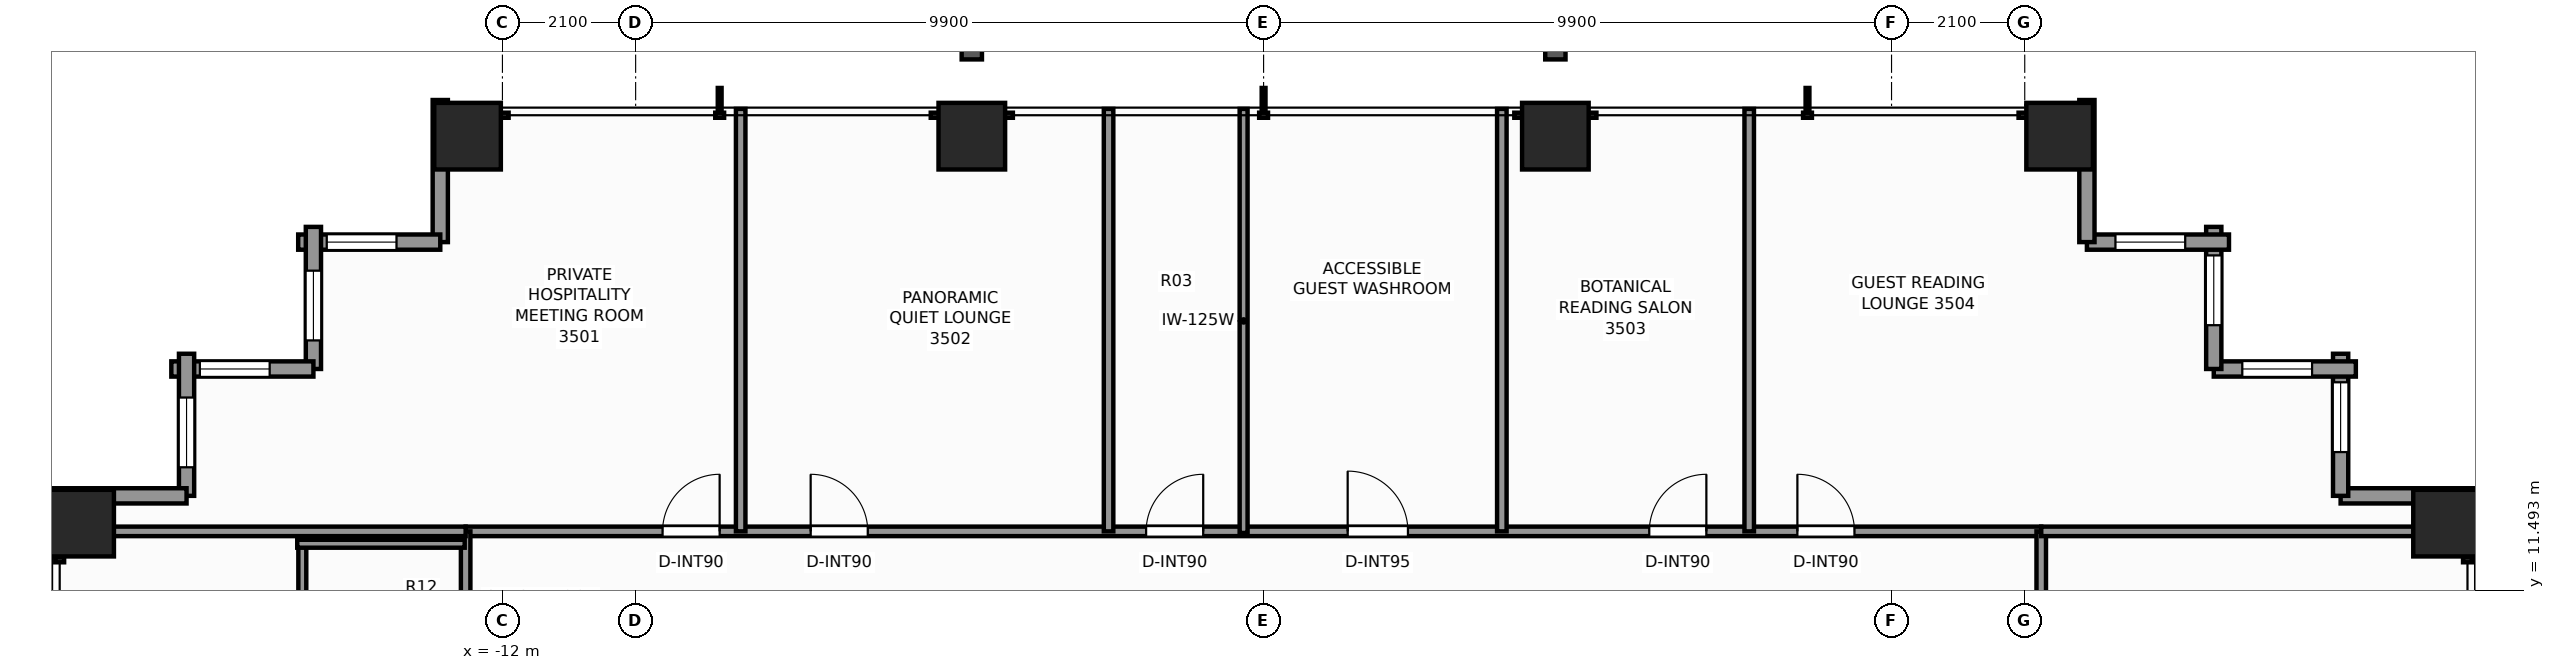
"""IFC4 building model, lengths in metres.
Left out: names, types, materials, properties, quantities, classifications, styles, units other than length and angle.
Written with IfcOpenShell. Run it as: python <this file> out.ifc"""

import sys

from ifc_helpers import new_model, si_unit, direction, frame, frame_2d, origin, origin_2d, place, context, subcontext, project, spatial, rectangle, extrude, element, fill, save


model = new_model("IFC4")
c1 = context("Model", 3, precision=1e-05, world=origin(), true_north=direction((0.0, 1.0)))
c2 = subcontext(c1, "Body", "Model", "MODEL_VIEW")
j1 = project(units=[si_unit("LENGTHUNIT", "METRE"), si_unit("PLANEANGLEUNIT", "RADIAN")], contexts=[c1])
p1 = place(None, origin())
s1 = spatial("IfcSite", under=j1, at=p1, CompositionType="ELEMENT")
p2 = place(p1, origin())
s2 = spatial("IfcBuilding", under=s1, at=p2, CompositionType="ELEMENT")
p3 = place(p2, frame((0.0, 0.0, 121.7)))
s3 = spatial("IfcBuildingStorey", under=s2, at=p3, CompositionType="ELEMENT", Elevation=121.7)
for number, where, z_axis, x_axis in (
    (1, (-12.55, 18.65, 0.0), (0.0, 0.0, 1.0), (1.0, 0.0, 0.0)),
    (2, (-4.6, 18.65, 0.0), (0.0, 0.0, 1.0), (1.0, 0.0, 0.0)),
    (3, (4.6, 18.65, 0.0), (0.0, 0.0, 1.0), (1.0, 0.0, 0.0)),
    (4, (12.55, 18.65, 0.0), (0.0, 0.0, 1.0), (1.0, 0.0, 0.0)),
    (5, (-18.65, 12.55, 0.0), (0.0, 0.0, 1.0), (1.0, 0.0, 0.0)),
    (6, (18.65, 12.55, 0.0), (0.0, 0.0, 1.0), (1.0, 0.0, 0.0)),
):
    element("IfcColumn", number, at=place(p3, frame(where, z_axis=z_axis, x_axis=x_axis)), inside=s3, PredefinedType="COLUMN", context=c2, shape_type="SweptSolid", body=[
        extrude(rectangle(XDim=1.05, YDim=1.05, at=origin_2d()), origin(), (0.0, 0.0, 1.0), 3.3),
    ])
p4 = place(p3, frame((16.98, 12.98, 0.0), z_axis=(0.0, 0.0, 1.0), x_axis=(1.0, 0.0, 0.0)))
e7 = element("IfcWall", 7, at=p4, inside=s3, PredefinedType="STANDARD", context=c2, shape_type="SweptSolid", body=[
    extrude(rectangle(XDim=2.24, YDim=0.24, at=frame_2d((1.12, 0.0))), origin(), (0.0, 0.0, 1.0), 2.459),
])
p5 = place(p3, frame((16.98, 15.22, 0.0), z_axis=(0.0, 0.0, 1.0), x_axis=(0.0, -1.0, 0.0)))
e8 = element("IfcWall", 8, at=p5, inside=s3, PredefinedType="STANDARD", context=c2, shape_type="SweptSolid", body=[
    extrude(rectangle(XDim=2.24, YDim=0.24, at=frame_2d((1.12, 0.0))), origin(), (0.0, 0.0, 1.0), 2.459),
])
p6 = place(p5, frame((0.45, 0.0, 0.65)))
e9 = element("IfcOpeningElement", 9, at=p6, cuts=e8, PredefinedType="OPENING", context=c2, shape_type="SweptSolid", body=[
    extrude(rectangle(XDim=1.1, YDim=1.45, at=frame_2d((0.55, 0.725))), frame((0.0, 0.13, 0.0), z_axis=(0.0, -1.0, 0.0), x_axis=(1.0, 0.0, 0.0)), (0.0, 0.0, 1.0), 0.26),
])
p7 = place(p3, frame((14.98, 14.98, 0.0), z_axis=(0.0, 0.0, 1.0), x_axis=(1.0, 0.0, 0.0)))
e10 = element("IfcWall", 10, at=p7, inside=s3, PredefinedType="STANDARD", context=c2, shape_type="SweptSolid", body=[
    extrude(rectangle(XDim=2.24, YDim=0.24, at=frame_2d((1.12, 0.0))), origin(), (0.0, 0.0, 1.0), 2.459),
])
p8 = place(p7, frame((0.45, 0.0, 0.65)))
e11 = element("IfcOpeningElement", 11, at=p8, cuts=e10, PredefinedType="OPENING", context=c2, shape_type="SweptSolid", body=[
    extrude(rectangle(XDim=1.1, YDim=1.45, at=frame_2d((0.55, 0.725))), frame((0.0, 0.13, 0.0), z_axis=(0.0, -1.0, 0.0), x_axis=(1.0, 0.0, 0.0)), (0.0, 0.0, 1.0), 0.26),
])
p9 = place(p3, frame((14.98, 17.22, 0.0), z_axis=(0.0, 0.0, 1.0), x_axis=(0.0, -1.0, 0.0)))
e12 = element("IfcWall", 12, at=p9, inside=s3, PredefinedType="STANDARD", context=c2, shape_type="SweptSolid", body=[
    extrude(rectangle(XDim=2.24, YDim=0.24, at=frame_2d((1.12, 0.0))), origin(), (0.0, 0.0, 1.0), 2.459),
])
p10 = place(p9, frame((0.45, 0.0, 0.65)))
e13 = element("IfcOpeningElement", 13, at=p10, cuts=e12, PredefinedType="OPENING", context=c2, shape_type="SweptSolid", body=[
    extrude(rectangle(XDim=1.1, YDim=1.45, at=frame_2d((0.55, 0.725))), frame((0.0, 0.13, 0.0), z_axis=(0.0, -1.0, 0.0), x_axis=(1.0, 0.0, 0.0)), (0.0, 0.0, 1.0), 0.26),
])
p11 = place(p3, frame((12.98, 16.98, 0.0), z_axis=(0.0, 0.0, 1.0), x_axis=(1.0, 0.0, 0.0)))
e14 = element("IfcWall", 14, at=p11, inside=s3, PredefinedType="STANDARD", context=c2, shape_type="SweptSolid", body=[
    extrude(rectangle(XDim=2.24, YDim=0.24, at=frame_2d((1.12, 0.0))), origin(), (0.0, 0.0, 1.0), 2.459),
])
p12 = place(p11, frame((0.45, 0.0, 0.65)))
e15 = element("IfcOpeningElement", 15, at=p12, cuts=e14, PredefinedType="OPENING", context=c2, shape_type="SweptSolid", body=[
    extrude(rectangle(XDim=1.1, YDim=1.45, at=frame_2d((0.55, 0.725))), frame((0.0, 0.13, 0.0), z_axis=(0.0, -1.0, 0.0), x_axis=(1.0, 0.0, 0.0)), (0.0, 0.0, 1.0), 0.26),
])
for number, where, z_axis, x_axis in (
    (16, (12.98, 19.22, 0.0), (0.0, 0.0, 1.0), (0.0, -1.0, 0.0)),
    (17, (-12.98, 16.98, 0.0), (0.0, 0.0, 1.0), (0.0, 1.0, 0.0)),
):
    element("IfcWall", number, at=place(p3, frame(where, z_axis=z_axis, x_axis=x_axis)), inside=s3, PredefinedType="STANDARD", context=c2, shape_type="SweptSolid", body=[
        extrude(rectangle(XDim=2.24, YDim=0.24, at=frame_2d((1.12, 0.0))), origin(), (0.0, 0.0, 1.0), 2.459),
    ])
p13 = place(p3, frame((-15.22, 16.98, 0.0), z_axis=(0.0, 0.0, 1.0), x_axis=(1.0, 0.0, 0.0)))
e18 = element("IfcWall", 18, at=p13, inside=s3, PredefinedType="STANDARD", context=c2, shape_type="SweptSolid", body=[
    extrude(rectangle(XDim=2.24, YDim=0.24, at=frame_2d((1.12, 0.0))), origin(), (0.0, 0.0, 1.0), 2.459),
])
p14 = place(p13, frame((0.45, 0.0, 0.65)))
e19 = element("IfcOpeningElement", 19, at=p14, cuts=e18, PredefinedType="OPENING", context=c2, shape_type="SweptSolid", body=[
    extrude(rectangle(XDim=1.1, YDim=1.45, at=frame_2d((0.55, 0.725))), frame((0.0, 0.13, 0.0), z_axis=(0.0, -1.0, 0.0), x_axis=(1.0, 0.0, 0.0)), (0.0, 0.0, 1.0), 0.26),
])
p15 = place(p3, frame((-14.98, 14.98, 0.0), z_axis=(0.0, 0.0, 1.0), x_axis=(0.0, 1.0, 0.0)))
e20 = element("IfcWall", 20, at=p15, inside=s3, PredefinedType="STANDARD", context=c2, shape_type="SweptSolid", body=[
    extrude(rectangle(XDim=2.24, YDim=0.24, at=frame_2d((1.12, 0.0))), origin(), (0.0, 0.0, 1.0), 2.459),
])
p16 = place(p15, frame((0.45, 0.0, 0.65)))
e21 = element("IfcOpeningElement", 21, at=p16, cuts=e20, PredefinedType="OPENING", context=c2, shape_type="SweptSolid", body=[
    extrude(rectangle(XDim=1.1, YDim=1.45, at=frame_2d((0.55, 0.725))), frame((0.0, 0.13, 0.0), z_axis=(0.0, -1.0, 0.0), x_axis=(1.0, 0.0, 0.0)), (0.0, 0.0, 1.0), 0.26),
])
p17 = place(p3, frame((-17.22, 14.98, 0.0), z_axis=(0.0, 0.0, 1.0), x_axis=(1.0, 0.0, 0.0)))
e22 = element("IfcWall", 22, at=p17, inside=s3, PredefinedType="STANDARD", context=c2, shape_type="SweptSolid", body=[
    extrude(rectangle(XDim=2.24, YDim=0.24, at=frame_2d((1.12, 0.0))), origin(), (0.0, 0.0, 1.0), 2.459),
])
p18 = place(p17, frame((0.45, 0.0, 0.65)))
e23 = element("IfcOpeningElement", 23, at=p18, cuts=e22, PredefinedType="OPENING", context=c2, shape_type="SweptSolid", body=[
    extrude(rectangle(XDim=1.1, YDim=1.45, at=frame_2d((0.55, 0.725))), frame((0.0, 0.13, 0.0), z_axis=(0.0, -1.0, 0.0), x_axis=(1.0, 0.0, 0.0)), (0.0, 0.0, 1.0), 0.26),
])
p19 = place(p3, frame((-16.98, 12.98, 0.0), z_axis=(0.0, 0.0, 1.0), x_axis=(0.0, 1.0, 0.0)))
e24 = element("IfcWall", 24, at=p19, inside=s3, PredefinedType="STANDARD", context=c2, shape_type="SweptSolid", body=[
    extrude(rectangle(XDim=2.24, YDim=0.24, at=frame_2d((1.12, 0.0))), origin(), (0.0, 0.0, 1.0), 2.459),
])
p20 = place(p19, frame((0.45, 0.0, 0.65)))
e25 = element("IfcOpeningElement", 25, at=p20, cuts=e24, PredefinedType="OPENING", context=c2, shape_type="SweptSolid", body=[
    extrude(rectangle(XDim=1.1, YDim=1.45, at=frame_2d((0.55, 0.725))), frame((0.0, 0.13, 0.0), z_axis=(0.0, -1.0, 0.0), x_axis=(1.0, 0.0, 0.0)), (0.0, 0.0, 1.0), 0.26),
])
p21 = place(p3, frame((-19.22, 12.98, 0.0), z_axis=(0.0, 0.0, 1.0), x_axis=(1.0, 0.0, 0.0)))
e26 = element("IfcWall", 26, at=p21, inside=s3, PredefinedType="STANDARD", context=c2, shape_type="SweptSolid", body=[
    extrude(rectangle(XDim=2.24, YDim=0.24, at=frame_2d((1.12, 0.0))), origin(), (0.0, 0.0, 1.0), 2.459),
])
p22 = place(p3, frame((-12.58, 12.42, 0.0), z_axis=(0.0, 0.0, 1.0), x_axis=(1.0, 0.0, 0.0)))
e27 = element("IfcWall", 27, at=p22, inside=s3, PredefinedType="PARTITIONING", context=c2, shape_type="SweptSolid", body=[
    extrude(rectangle(XDim=24.84, YDim=0.15, at=frame_2d((12.42, 0.0))), origin(), (0.0, 0.0, 1.0), 2.292),
])
p23 = place(p22, frame((3.104, 0.0, 0.0)))
e28 = element("IfcOpeningElement", 28, at=p23, cuts=e27, PredefinedType="OPENING", context=c2, shape_type="SweptSolid", body=[
    extrude(rectangle(XDim=0.9, YDim=2.06, at=frame_2d((0.45, 1.03))), frame((0.0, 0.085, 0.0), z_axis=(0.0, -1.0, 0.0), x_axis=(1.0, 0.0, 0.0)), (0.0, 0.0, 1.0), 0.17),
])
p24 = place(p22, frame((5.439, 0.0, 0.0)))
e29 = element("IfcOpeningElement", 29, at=p24, cuts=e27, PredefinedType="OPENING", context=c2, shape_type="SweptSolid", body=[
    extrude(rectangle(XDim=0.9, YDim=2.06, at=frame_2d((0.45, 1.03))), frame((0.0, 0.085, 0.0), z_axis=(0.0, -1.0, 0.0), x_axis=(1.0, 0.0, 0.0)), (0.0, 0.0, 1.0), 0.17),
])
p25 = place(p22, frame((10.728, 0.0, 0.0)))
e30 = element("IfcOpeningElement", 30, at=p25, cuts=e27, PredefinedType="OPENING", context=c2, shape_type="SweptSolid", body=[
    extrude(rectangle(XDim=0.9, YDim=2.06, at=frame_2d((0.45, 1.03))), frame((0.0, 0.085, 0.0), z_axis=(0.0, -1.0, 0.0), x_axis=(1.0, 0.0, 0.0)), (0.0, 0.0, 1.0), 0.17),
])
p26 = place(p22, frame((13.906, 0.0, 0.0)))
e31 = element("IfcOpeningElement", 31, at=p26, cuts=e27, PredefinedType="OPENING", context=c2, shape_type="SweptSolid", body=[
    extrude(rectangle(XDim=0.95, YDim=2.06, at=frame_2d((0.475, 1.03))), frame((0.0, 0.085, 0.0), z_axis=(0.0, -1.0, 0.0), x_axis=(1.0, 0.0, 0.0)), (0.0, 0.0, 1.0), 0.17),
])
p27 = place(p22, frame((18.661, 0.0, 0.0)))
e32 = element("IfcOpeningElement", 32, at=p27, cuts=e27, PredefinedType="OPENING", context=c2, shape_type="SweptSolid", body=[
    extrude(rectangle(XDim=0.9, YDim=2.06, at=frame_2d((0.45, 1.03))), frame((0.0, 0.085, 0.0), z_axis=(0.0, -1.0, 0.0), x_axis=(1.0, 0.0, 0.0)), (0.0, 0.0, 1.0), 0.17),
])
p28 = place(p22, frame((20.996, 0.0, 0.0)))
e33 = element("IfcOpeningElement", 33, at=p28, cuts=e27, PredefinedType="OPENING", context=c2, shape_type="SweptSolid", body=[
    extrude(rectangle(XDim=0.9, YDim=2.06, at=frame_2d((0.45, 1.03))), frame((0.0, 0.085, 0.0), z_axis=(0.0, -1.0, 0.0), x_axis=(1.0, 0.0, 0.0)), (0.0, 0.0, 1.0), 0.17),
])
p29 = place(p3, frame((-12.58, 7.4, 0.0), z_axis=(0.0, 0.0, 1.0), x_axis=(0.0, 1.0, 0.0)))
e34 = element("IfcWall", 34, at=p29, inside=s3, PredefinedType="PARTITIONING", context=c2, shape_type="SweptSolid", body=[
    extrude(rectangle(XDim=5.02, YDim=0.15, at=frame_2d((2.51, 0.0))), origin(), (0.0, 0.0, 1.0), 2.292),
])
p30 = place(p29, frame((0.689, 0.0, 0.0)))
e35 = element("IfcOpeningElement", 35, at=p30, cuts=e34, PredefinedType="OPENING", context=c2, shape_type="SweptSolid", body=[
    extrude(rectangle(XDim=0.95, YDim=2.06, at=frame_2d((0.475, 1.03))), frame((0.0, 0.085, 0.0), z_axis=(0.0, -1.0, 0.0), x_axis=(1.0, 0.0, 0.0)), (0.0, 0.0, 1.0), 0.17),
])
p31 = place(p3, frame((12.26, -12.42, 0.0), z_axis=(0.0, 0.0, 1.0), x_axis=(0.0, 1.0, 0.0)))
e36 = element("IfcWall", 36, at=p31, inside=s3, PredefinedType="PARTITIONING", context=c2, shape_type="SweptSolid", body=[
    extrude(rectangle(XDim=24.84, YDim=0.15, at=frame_2d((12.42, 0.0))), origin(), (0.0, 0.0, 1.0), 2.292),
])
p32 = place(p31, frame((4.224, 0.0, 0.0)))
e37 = element("IfcOpeningElement", 37, at=p32, cuts=e36, PredefinedType="OPENING", context=c2, shape_type="SweptSolid", body=[
    extrude(rectangle(XDim=0.95, YDim=2.06, at=frame_2d((0.475, 1.03))), frame((0.0, 0.085, 0.0), z_axis=(0.0, -1.0, 0.0), x_axis=(1.0, 0.0, 0.0)), (0.0, 0.0, 1.0), 0.17),
])
p33 = place(p31, frame((10.417, 0.0, 0.0)))
e38 = element("IfcOpeningElement", 38, at=p33, cuts=e36, PredefinedType="OPENING", context=c2, shape_type="SweptSolid", body=[
    extrude(rectangle(XDim=0.95, YDim=2.06, at=frame_2d((0.475, 1.03))), frame((0.0, 0.085, 0.0), z_axis=(0.0, -1.0, 0.0), x_axis=(1.0, 0.0, 0.0)), (0.0, 0.0, 1.0), 0.17),
])
p34 = place(p31, frame((18.556, 0.0, 0.0)))
e39 = element("IfcOpeningElement", 39, at=p34, cuts=e36, PredefinedType="OPENING", context=c2, shape_type="SweptSolid", body=[
    extrude(rectangle(XDim=0.95, YDim=2.06, at=frame_2d((0.475, 1.03))), frame((0.0, 0.085, 0.0), z_axis=(0.0, -1.0, 0.0), x_axis=(1.0, 0.0, 0.0)), (0.0, 0.0, 1.0), 0.17),
])
p35 = place(p31, frame((20.916, 0.0, 0.0)))
e40 = element("IfcOpeningElement", 40, at=p35, cuts=e36, PredefinedType="OPENING", context=c2, shape_type="SweptSolid", body=[
    extrude(rectangle(XDim=0.9, YDim=2.06, at=frame_2d((0.45, 1.03))), frame((0.0, 0.085, 0.0), z_axis=(0.0, -1.0, 0.0), x_axis=(1.0, 0.0, 0.0)), (0.0, 0.0, 1.0), 0.17),
])
p36 = place(p3, frame((-19.08, 12.42, 0.0), z_axis=(0.0, 0.0, 1.0), x_axis=(1.0, 0.0, 0.0)))
e41 = element("IfcWall", 41, at=p36, inside=s3, PredefinedType="PARTITIONING", context=c2, shape_type="SweptSolid", body=[
    extrude(rectangle(XDim=6.5, YDim=0.15, at=frame_2d((3.25, 0.0))), origin(), (0.0, 0.0, 1.0), 2.292),
])
p37 = place(p3, frame((12.26, 12.42, 0.0), z_axis=(0.0, 0.0, 1.0), x_axis=(1.0, 0.0, 0.0)))
e42 = element("IfcWall", 42, at=p37, inside=s3, PredefinedType="PARTITIONING", context=c2, shape_type="SweptSolid", body=[
    extrude(rectangle(XDim=6.82, YDim=0.15, at=frame_2d((3.41, 0.0))), origin(), (0.0, 0.0, 1.0), 2.292),
])
for number, where, z_axis, x_axis in (
    (43, (-8.244, 12.42, 0.0), (0.0, 0.0, 1.0), (0.0, 1.0, 0.0)),
    (44, (-2.444, 12.42, 0.0), (0.0, 0.0, 1.0), (0.0, 1.0, 0.0)),
    (45, (3.756, 12.42, 0.0), (0.0, 0.0, 1.0), (0.0, 1.0, 0.0)),
):
    element("IfcWall", number, at=place(p3, frame(where, z_axis=z_axis, x_axis=x_axis)), inside=s3, PredefinedType="PARTITIONING", context=c2, shape_type="SweptSolid", body=[
        extrude(rectangle(XDim=6.66, YDim=0.15, at=frame_2d((3.33, 0.0))), origin(), (0.0, 0.0, 1.0), 2.449),
    ])
p38 = place(p3, frame((-0.315, 12.395, 0.0), z_axis=(0.0, 0.0, 1.0), x_axis=(0.0, 1.0, 0.0)))
e46 = element("IfcWall", 46, at=p38, inside=s3, PredefinedType="PARTITIONING", context=c2, shape_type="SweptSolid", body=[
    extrude(rectangle(XDim=6.685, YDim=0.125, at=frame_2d((3.343, 0.0))), origin(), (0.0, 0.0, 1.0), 2.449),
])
p39 = place(p3, frame((7.656, 12.42, 0.0), z_axis=(0.0, 0.0, 1.0), x_axis=(0.0, 1.0, 0.0)))
e47 = element("IfcWall", 47, at=p39, inside=s3, PredefinedType="PARTITIONING", context=c2, shape_type="SweptSolid", body=[
    extrude(rectangle(XDim=6.66, YDim=0.15, at=frame_2d((3.33, 0.0))), origin(), (0.0, 0.0, 1.0), 2.449),
])
p40 = place(p3, frame((-15.155, 9.765, 0.0), z_axis=(0.0, 0.0, 1.0), x_axis=(0.0, 1.0, 0.0)))
e48 = element("IfcWall", 48, at=p40, inside=s3, PredefinedType="PARTITIONING", context=c2, shape_type="SweptSolid", body=[
    extrude(rectangle(XDim=2.52, YDim=0.125, at=frame_2d((1.26, 0.0))), origin(), (0.0, 0.0, 1.0), 2.292),
])
p41 = place(p3, frame((-15.235, 12.225, 0.0), z_axis=(0.0, 0.0, 1.0), x_axis=(1.0, 0.0, 0.0)))
e49 = element("IfcWall", 49, at=p41, inside=s3, PredefinedType="PARTITIONING", context=c2, shape_type="SweptSolid", body=[
    extrude(rectangle(XDim=2.64, YDim=0.125, at=frame_2d((1.32, 0.0))), origin(), (0.0, 0.0, 1.0), 3.08),
])
p42 = place(p6, origin())
e50 = element("IfcWindow", 50, at=p42, inside=s3, PartitioningType="SINGLE_PANEL", PredefinedType="WINDOW", context=c2, shape_type="SweptSolid", body=[
    extrude(rectangle(XDim=1.1, YDim=1.45, at=frame_2d((0.55, 0.725))), frame((0.0, 0.03, 0.0), z_axis=(0.0, -1.0, 0.0), x_axis=(1.0, 0.0, 0.0)), (0.0, 0.0, 1.0), 0.06),
])
fill(e9, e50)
p43 = place(p8, origin())
e51 = element("IfcWindow", 51, at=p43, inside=s3, PartitioningType="SINGLE_PANEL", PredefinedType="WINDOW", context=c2, shape_type="SweptSolid", body=[
    extrude(rectangle(XDim=1.1, YDim=1.45, at=frame_2d((0.55, 0.725))), frame((0.0, 0.03, 0.0), z_axis=(0.0, -1.0, 0.0), x_axis=(1.0, 0.0, 0.0)), (0.0, 0.0, 1.0), 0.06),
])
fill(e11, e51)
p44 = place(p10, origin())
e52 = element("IfcWindow", 52, at=p44, inside=s3, PartitioningType="SINGLE_PANEL", PredefinedType="WINDOW", context=c2, shape_type="SweptSolid", body=[
    extrude(rectangle(XDim=1.1, YDim=1.45, at=frame_2d((0.55, 0.725))), frame((0.0, 0.03, 0.0), z_axis=(0.0, -1.0, 0.0), x_axis=(1.0, 0.0, 0.0)), (0.0, 0.0, 1.0), 0.06),
])
fill(e13, e52)
p45 = place(p12, origin())
e53 = element("IfcWindow", 53, at=p45, inside=s3, PartitioningType="SINGLE_PANEL", PredefinedType="WINDOW", context=c2, shape_type="SweptSolid", body=[
    extrude(rectangle(XDim=1.1, YDim=1.45, at=frame_2d((0.55, 0.725))), frame((0.0, 0.03, 0.0), z_axis=(0.0, -1.0, 0.0), x_axis=(1.0, 0.0, 0.0)), (0.0, 0.0, 1.0), 0.06),
])
fill(e15, e53)
p46 = place(p14, origin())
e54 = element("IfcWindow", 54, at=p46, inside=s3, PartitioningType="SINGLE_PANEL", PredefinedType="WINDOW", context=c2, shape_type="SweptSolid", body=[
    extrude(rectangle(XDim=1.1, YDim=1.45, at=frame_2d((0.55, 0.725))), frame((0.0, 0.03, 0.0), z_axis=(0.0, -1.0, 0.0), x_axis=(1.0, 0.0, 0.0)), (0.0, 0.0, 1.0), 0.06),
])
fill(e19, e54)
p47 = place(p16, origin())
e55 = element("IfcWindow", 55, at=p47, inside=s3, PartitioningType="SINGLE_PANEL", PredefinedType="WINDOW", context=c2, shape_type="SweptSolid", body=[
    extrude(rectangle(XDim=1.1, YDim=1.45, at=frame_2d((0.55, 0.725))), frame((0.0, 0.03, 0.0), z_axis=(0.0, -1.0, 0.0), x_axis=(1.0, 0.0, 0.0)), (0.0, 0.0, 1.0), 0.06),
])
fill(e21, e55)
p48 = place(p18, origin())
e56 = element("IfcWindow", 56, at=p48, inside=s3, PartitioningType="SINGLE_PANEL", PredefinedType="WINDOW", context=c2, shape_type="SweptSolid", body=[
    extrude(rectangle(XDim=1.1, YDim=1.45, at=frame_2d((0.55, 0.725))), frame((0.0, 0.03, 0.0), z_axis=(0.0, -1.0, 0.0), x_axis=(1.0, 0.0, 0.0)), (0.0, 0.0, 1.0), 0.06),
])
fill(e23, e56)
p49 = place(p20, origin())
e57 = element("IfcWindow", 57, at=p49, inside=s3, PartitioningType="SINGLE_PANEL", PredefinedType="WINDOW", context=c2, shape_type="SweptSolid", body=[
    extrude(rectangle(XDim=1.1, YDim=1.45, at=frame_2d((0.55, 0.725))), frame((0.0, 0.03, 0.0), z_axis=(0.0, -1.0, 0.0), x_axis=(1.0, 0.0, 0.0)), (0.0, 0.0, 1.0), 0.06),
])
fill(e25, e57)
p50 = place(p23, origin())
e58 = element("IfcDoor", 58, at=p50, inside=s3, OperationType="SINGLE_SWING_RIGHT", PredefinedType="DOOR", context=c2, shape_type="SweptSolid", body=[
    extrude(rectangle(XDim=0.9, YDim=2.06, at=frame_2d((0.45, 1.03))), frame((0.0, 0.025, 0.0), z_axis=(0.0, -1.0, 0.0), x_axis=(1.0, 0.0, 0.0)), (0.0, 0.0, 1.0), 0.05),
])
fill(e28, e58)
p51 = place(p24, origin())
e59 = element("IfcDoor", 59, at=p51, inside=s3, OperationType="SINGLE_SWING_LEFT", PredefinedType="DOOR", context=c2, shape_type="SweptSolid", body=[
    extrude(rectangle(XDim=0.9, YDim=2.06, at=frame_2d((0.45, 1.03))), frame((0.0, 0.025, 0.0), z_axis=(0.0, -1.0, 0.0), x_axis=(1.0, 0.0, 0.0)), (0.0, 0.0, 1.0), 0.05),
])
fill(e29, e59)
p52 = place(p25, origin())
e60 = element("IfcDoor", 60, at=p52, inside=s3, OperationType="SINGLE_SWING_RIGHT", PredefinedType="DOOR", context=c2, shape_type="SweptSolid", body=[
    extrude(rectangle(XDim=0.9, YDim=2.06, at=frame_2d((0.45, 1.03))), frame((0.0, 0.025, 0.0), z_axis=(0.0, -1.0, 0.0), x_axis=(1.0, 0.0, 0.0)), (0.0, 0.0, 1.0), 0.05),
])
fill(e30, e60)
p53 = place(p26, origin())
e61 = element("IfcDoor", 61, at=p53, inside=s3, OperationType="SINGLE_SWING_LEFT", PredefinedType="DOOR", context=c2, shape_type="SweptSolid", body=[
    extrude(rectangle(XDim=0.95, YDim=2.06, at=frame_2d((0.475, 1.03))), frame((0.0, 0.025, 0.0), z_axis=(0.0, -1.0, 0.0), x_axis=(1.0, 0.0, 0.0)), (0.0, 0.0, 1.0), 0.05),
])
fill(e31, e61)
p54 = place(p27, origin())
e62 = element("IfcDoor", 62, at=p54, inside=s3, OperationType="SINGLE_SWING_RIGHT", PredefinedType="DOOR", context=c2, shape_type="SweptSolid", body=[
    extrude(rectangle(XDim=0.9, YDim=2.06, at=frame_2d((0.45, 1.03))), frame((0.0, 0.025, 0.0), z_axis=(0.0, -1.0, 0.0), x_axis=(1.0, 0.0, 0.0)), (0.0, 0.0, 1.0), 0.05),
])
fill(e32, e62)
p55 = place(p28, origin())
e63 = element("IfcDoor", 63, at=p55, inside=s3, OperationType="SINGLE_SWING_LEFT", PredefinedType="DOOR", context=c2, shape_type="SweptSolid", body=[
    extrude(rectangle(XDim=0.9, YDim=2.06, at=frame_2d((0.45, 1.03))), frame((0.0, 0.025, 0.0), z_axis=(0.0, -1.0, 0.0), x_axis=(1.0, 0.0, 0.0)), (0.0, 0.0, 1.0), 0.05),
])
fill(e33, e63)
save(model, sys.argv[1])
